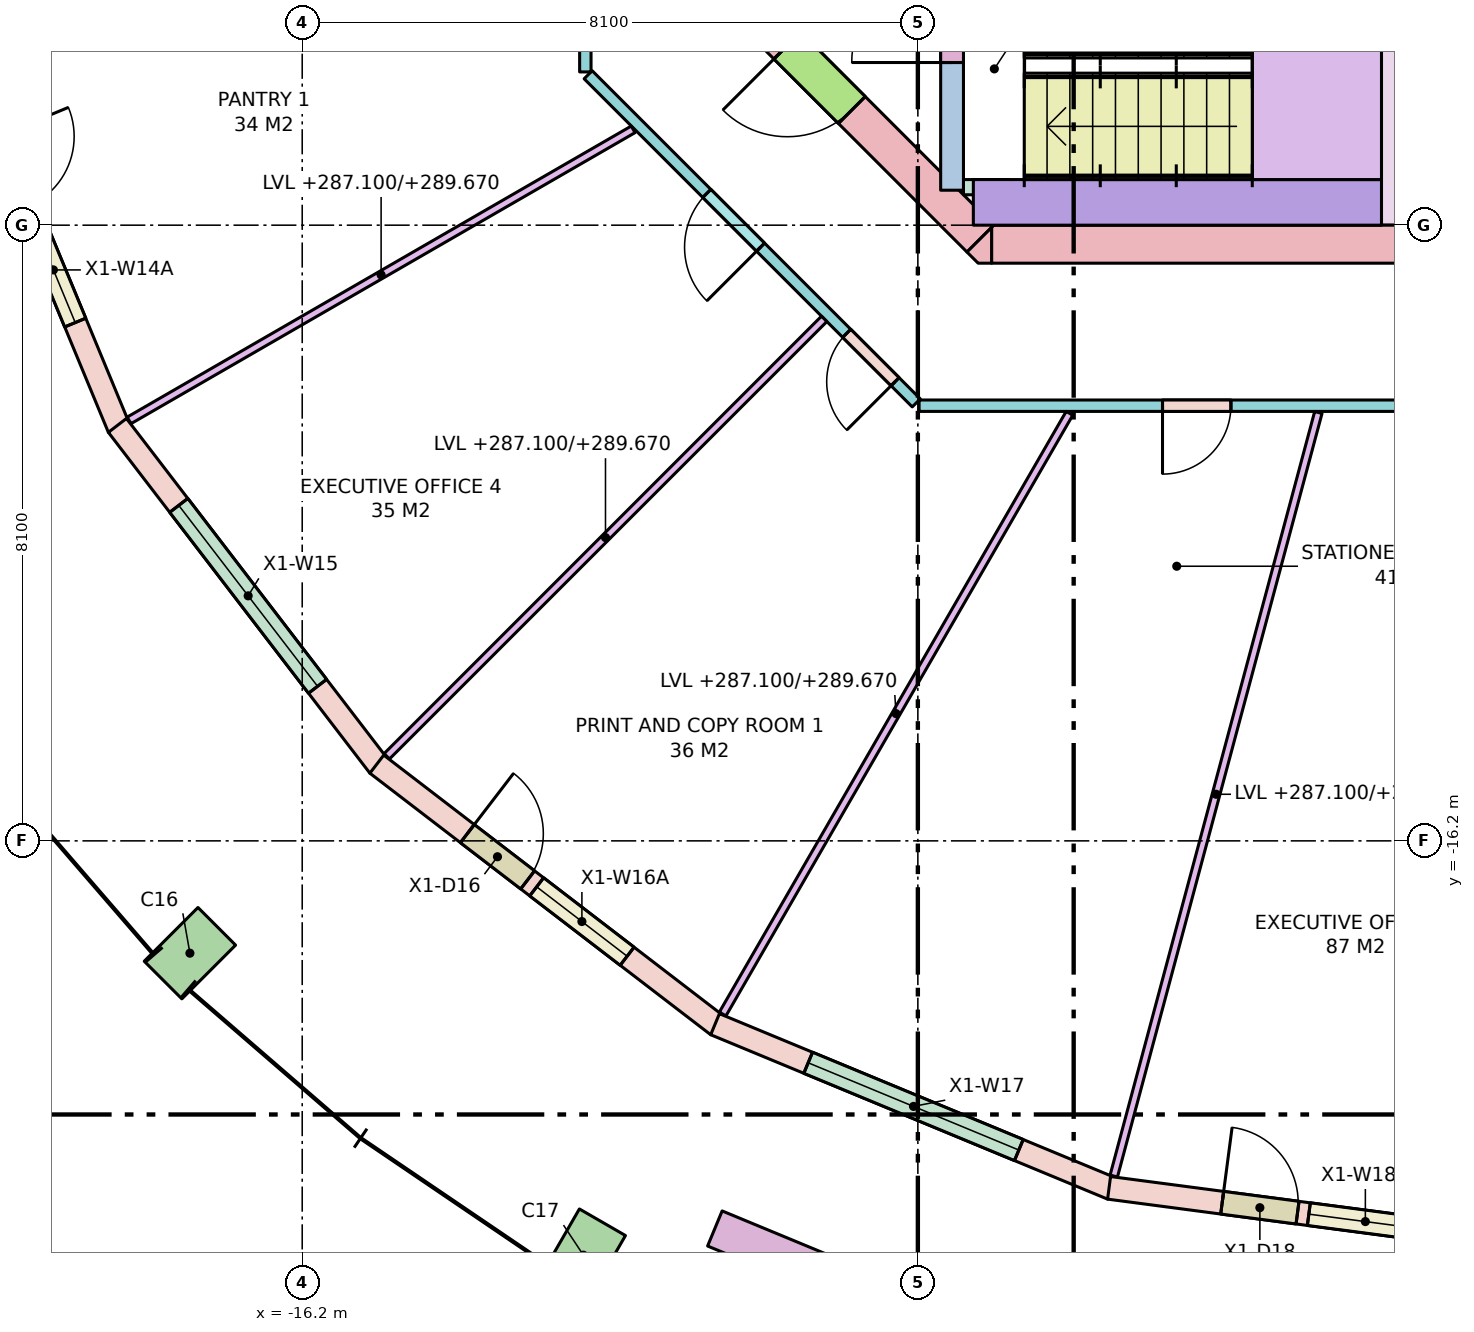
"""IFC4 building model, lengths in metres.
Left out: names, types, materials, properties, quantities, classifications, styles, units other than length and angle.
Written with IfcOpenShell. Run it as: python <this file> out.ifc"""

import sys

from ifc_helpers import new_model, si_unit, direction, frame, frame_2d, origin, origin_2d, place, context, subcontext, project, spatial, polyline, rectangle, outline, extrude, element, fill, save


model = new_model("IFC4")
c1 = context("Model", 3, precision=1e-05, world=origin(), true_north=direction((0.0, 1.0)))
c2 = subcontext(c1, "Body", "Model", "MODEL_VIEW")
j1 = project(units=[si_unit("LENGTHUNIT", "METRE"), si_unit("PLANEANGLEUNIT", "RADIAN")], contexts=[c1])
p1 = place(None, origin())
s1 = spatial("IfcSite", under=j1, at=p1, CompositionType="ELEMENT")
p2 = place(p1, origin())
s2 = spatial("IfcBuilding", under=s1, at=p2, CompositionType="ELEMENT")
p3 = place(p2, frame((0.0, 0.0, 287.1)))
s3 = spatial("IfcBuildingStorey", under=s2, at=p3, CompositionType="ELEMENT", Elevation=287.1)
for number, where, z_axis, x_axis in (
    (1, (-17.678, -17.678, 0.0), (0.0, 0.0, 1.0), (0.707, -0.707, 0.0)),
    (2, (-12.5, -21.651, 0.0), (0.0, 0.0, 1.0), (0.866, -0.5, 0.0)),
):
    element("IfcColumn", number, at=place(p3, frame(where, z_axis=z_axis, x_axis=x_axis)), inside=s3, PredefinedType="COLUMN", context=c2, shape_type="SweptSolid", body=[
        extrude(rectangle(XDim=0.7, YDim=1.0, at=origin_2d()), origin(), (0.0, 0.0, 1.0), 3.7),
    ])
p4 = place(p3, frame((-7.13, -8.35, -0.28), z_axis=(0.0, 0.0, 1.0), x_axis=(1.0, 0.0, 0.0)))
e3 = element("IfcWall", 3, at=p4, inside=s3, PredefinedType="SHEAR", context=c2, shape_type="SweptSolid", body=[
    extrude(rectangle(XDim=14.26, YDim=0.5, at=frame_2d((7.13, 0.0))), origin(), (0.0, 0.0, 1.0), 3.7),
])
p5 = place(p4, frame((8.08, 0.0, 0.28)))
e4 = element("IfcOpeningElement", 4, at=p5, cuts=e3, PredefinedType="OPENING", context=c2, shape_type="SweptSolid", body=[
    extrude(rectangle(XDim=0.7, YDim=2.1, at=frame_2d((0.35, 1.05))), frame((0.0, 0.26, 0.0), z_axis=(0.0, -1.0, 0.0), x_axis=(1.0, 0.0, 0.0)), (0.0, 0.0, 1.0), 0.52),
])
p6 = place(p4, frame((6.205, 0.0, 0.28)))
e5 = element("IfcOpeningElement", 5, at=p6, cuts=e3, PredefinedType="OPENING", context=c2, shape_type="SweptSolid", body=[
    extrude(rectangle(XDim=0.9, YDim=2.1, at=frame_2d((0.45, 1.05))), frame((0.0, 0.26, 0.0), z_axis=(0.0, -1.0, 0.0), x_axis=(1.0, 0.0, 0.0)), (0.0, 0.0, 1.0), 0.52),
])
p7 = place(p4, frame((10.667, 0.0, 0.28)))
e6 = element("IfcOpeningElement", 6, at=p7, cuts=e3, PredefinedType="OPENING", context=c2, shape_type="SweptSolid", body=[
    extrude(rectangle(XDim=0.9, YDim=2.1, at=frame_2d((0.45, 1.05))), frame((0.0, 0.26, 0.0), z_axis=(0.0, -1.0, 0.0), x_axis=(1.0, 0.0, 0.0)), (0.0, 0.0, 1.0), 0.52),
])
p8 = place(p3, frame((-7.277, -8.277, -0.28), z_axis=(0.0, 0.0, 1.0), x_axis=(-0.707106781187, 0.707106781187, 0.0)))
e7 = element("IfcWall", 7, at=p8, inside=s3, PredefinedType="SHEAR", context=c2, shape_type="SweptSolid", body=[
    extrude(rectangle(XDim=4.243, YDim=0.5, at=frame_2d((2.121, 0.0))), origin(), (0.0, 0.0, 1.0), 3.7),
])
p9 = place(p8, frame((2.393, 0.0, 0.28)))
e8 = element("IfcOpeningElement", 8, at=p9, cuts=e7, PredefinedType="OPENING", context=c2, shape_type="SweptSolid", body=[
    extrude(rectangle(XDim=1.2, YDim=2.1, at=frame_2d((0.6, 1.05))), frame((0.0, 0.26, 0.0), z_axis=(0.0, -1.0, 0.0), x_axis=(1.0, 0.0, 0.0)), (0.0, 0.0, 1.0), 0.52),
])
p10 = place(p3, frame((0.0, 0.0, -0.28)))
e9 = element("IfcWall", 9, at=p10, inside=s3, PredefinedType="SHEAR", context=c2, shape_type="SweptSolid", body=[
    extrude(outline(polyline([(-7.307, -8.6), (-7.454, -8.454), (-7.13, -8.13), (-7.13, -8.6), (-7.307, -8.6)])), origin(), (0.0, 0.0, 1.0), 3.7),
])
p11 = place(p3, frame((-1.85, -8.1, 0.0), z_axis=(0.0, 0.0, 1.0), x_axis=(0.0, 1.0, 0.0)))
e10 = element("IfcWall", 10, at=p11, inside=s3, PredefinedType="SHEAR", context=c2, shape_type="SweptSolid", body=[
    extrude(rectangle(XDim=6.6, YDim=0.3, at=frame_2d((3.3, 0.0))), origin(), (0.0, 0.0, 1.0), 3.42),
])
p12 = place(p3, frame((-7.65, -7.64, 0.0), z_axis=(0.0, 0.0, 1.0), x_axis=(0.0, 1.0, 0.0)))
e11 = element("IfcWall", 11, at=p12, inside=s3, PredefinedType="SHEAR", context=c2, shape_type="SweptSolid", body=[
    extrude(rectangle(XDim=3.14, YDim=0.3, at=frame_2d((1.57, 0.0))), origin(), (0.0, 0.0, 1.0), 3.42),
])
p13 = place(p12, frame((1.68, 0.0, 0.0)))
e12 = element("IfcOpeningElement", 12, at=p13, cuts=e11, PredefinedType="OPENING", context=c2, shape_type="SweptSolid", body=[
    extrude(rectangle(XDim=1.32, YDim=2.1, at=frame_2d((0.66, 1.05))), frame((0.0, 0.16, 0.0), z_axis=(0.0, -1.0, 0.0), x_axis=(1.0, 0.0, 0.0)), (0.0, 0.0, 1.0), 0.32),
])
p14 = place(p3, frame((-7.5, -7.6, 0.0), z_axis=(0.0, 0.0, 1.0), x_axis=(1.0, 0.0, 0.0)))
e13 = element("IfcWall", 13, at=p14, inside=s3, PredefinedType="SHEAR", context=c2, shape_type="SweptSolid", body=[
    extrude(rectangle(XDim=0.6, YDim=0.2, at=frame_2d((0.3, 0.0))), origin(), (0.0, 0.0, 1.0), 3.42),
])
p15 = place(p3, frame((-7.37, -7.8, 0.0), z_axis=(0.0, 0.0, 1.0), x_axis=(1.0, 0.0, 0.0)))
e14 = element("IfcWall", 14, at=p15, inside=s3, PredefinedType="SHEAR", context=c2, shape_type="SweptSolid", body=[
    extrude(rectangle(XDim=5.37, YDim=0.6, at=frame_2d((2.685, 0.0))), origin(), (0.0, 0.0, 1.0), 3.42),
])
p16 = place(p3, frame((-20.775, -5.546, 0.0), z_axis=(0.0, 0.0, 1.0), x_axis=(0.382660798975, -0.923888907244, 0.0)))
e15 = element("IfcWall", 15, at=p16, inside=s3, PredefinedType="STANDARD", context=c2, shape_type="SweptSolid", body=[
    extrude(rectangle(XDim=5.652, YDim=0.3, at=frame_2d((2.826, 0.0))), origin(), (0.0, 0.0, 1.0), 3.42),
])
p17 = place(p16, frame((1.501, 0.0, 0.0)))
e16 = element("IfcOpeningElement", 16, at=p17, cuts=e15, PredefinedType="OPENING", context=c2, shape_type="SweptSolid", body=[
    extrude(rectangle(XDim=1.0, YDim=2.4, at=frame_2d((0.5, 1.2))), frame((0.0, 0.16, 0.0), z_axis=(0.0, -1.0, 0.0), x_axis=(1.0, 0.0, 0.0)), (0.0, 0.0, 1.0), 0.32),
])
p18 = place(p16, frame((2.651, 0.0, 0.8)))
e17 = element("IfcOpeningElement", 17, at=p18, cuts=e15, PredefinedType="OPENING", context=c2, shape_type="SweptSolid", body=[
    extrude(rectangle(XDim=1.5, YDim=2.4, at=frame_2d((0.75, 1.2))), frame((0.0, 0.16, 0.0), z_axis=(0.0, -1.0, 0.0), x_axis=(1.0, 0.0, 0.0)), (0.0, 0.0, 1.0), 0.32),
])
p19 = place(p3, frame((-18.632, -10.734, 0.0), z_axis=(0.0, 0.0, 1.0), x_axis=(0.608747976925, -0.793363662257, 0.0)))
e18 = element("IfcWall", 18, at=p19, inside=s3, PredefinedType="STANDARD", context=c2, shape_type="SweptSolid", body=[
    extrude(rectangle(XDim=5.652, YDim=0.3, at=frame_2d((2.826, 0.0))), origin(), (0.0, 0.0, 1.0), 3.42),
])
p20 = place(p19, frame((1.326, 0.0, 0.8)))
e19 = element("IfcOpeningElement", 19, at=p20, cuts=e18, PredefinedType="OPENING", context=c2, shape_type="SweptSolid", body=[
    extrude(rectangle(XDim=3.0, YDim=2.4, at=frame_2d((1.5, 1.2))), frame((0.0, 0.16, 0.0), z_axis=(0.0, -1.0, 0.0), x_axis=(1.0, 0.0, 0.0)), (0.0, 0.0, 1.0), 0.32),
])
p21 = place(p3, frame((-15.219, -15.191, 0.0), z_axis=(0.0, 0.0, 1.0), x_axis=(0.793363662257, -0.608747976925, 0.0)))
e20 = element("IfcWall", 20, at=p21, inside=s3, PredefinedType="STANDARD", context=c2, shape_type="SweptSolid", body=[
    extrude(rectangle(XDim=5.652, YDim=0.3, at=frame_2d((2.826, 0.0))), origin(), (0.0, 0.0, 1.0), 3.42),
])
p22 = place(p21, frame((1.501, 0.0, 0.0)))
e21 = element("IfcOpeningElement", 21, at=p22, cuts=e20, PredefinedType="OPENING", context=c2, shape_type="SweptSolid", body=[
    extrude(rectangle(XDim=1.0, YDim=2.4, at=frame_2d((0.5, 1.2))), frame((0.0, 0.16, 0.0), z_axis=(0.0, -1.0, 0.0), x_axis=(1.0, 0.0, 0.0)), (0.0, 0.0, 1.0), 0.32),
])
p23 = place(p21, frame((2.651, 0.0, 0.8)))
e22 = element("IfcOpeningElement", 22, at=p23, cuts=e20, PredefinedType="OPENING", context=c2, shape_type="SweptSolid", body=[
    extrude(rectangle(XDim=1.5, YDim=2.4, at=frame_2d((0.75, 1.2))), frame((0.0, 0.16, 0.0), z_axis=(0.0, -1.0, 0.0), x_axis=(1.0, 0.0, 0.0)), (0.0, 0.0, 1.0), 0.32),
])
p24 = place(p3, frame((-10.768, -18.612, 0.0), z_axis=(0.0, 0.0, 1.0), x_axis=(0.923888907244, -0.382660798975, 0.0)))
e23 = element("IfcWall", 23, at=p24, inside=s3, PredefinedType="STANDARD", context=c2, shape_type="SweptSolid", body=[
    extrude(rectangle(XDim=5.652, YDim=0.3, at=frame_2d((2.826, 0.0))), origin(), (0.0, 0.0, 1.0), 3.42),
])
p25 = place(p24, frame((1.326, 0.0, 0.8)))
e24 = element("IfcOpeningElement", 24, at=p25, cuts=e23, PredefinedType="OPENING", context=c2, shape_type="SweptSolid", body=[
    extrude(rectangle(XDim=3.0, YDim=2.4, at=frame_2d((1.5, 1.2))), frame((0.0, 0.16, 0.0), z_axis=(0.0, -1.0, 0.0), x_axis=(1.0, 0.0, 0.0)), (0.0, 0.0, 1.0), 0.32),
])
p26 = place(p3, frame((-5.584, -20.765, 0.0), z_axis=(0.0, 0.0, 1.0), x_axis=(0.991443853938, -0.130533844229, 0.0)))
e25 = element("IfcWall", 25, at=p26, inside=s3, PredefinedType="STANDARD", context=c2, shape_type="SweptSolid", body=[
    extrude(rectangle(XDim=5.652, YDim=0.3, at=frame_2d((2.826, 0.0))), origin(), (0.0, 0.0, 1.0), 3.42),
])
p27 = place(p26, frame((1.501, 0.0, 0.0)))
e26 = element("IfcOpeningElement", 26, at=p27, cuts=e25, PredefinedType="OPENING", context=c2, shape_type="SweptSolid", body=[
    extrude(rectangle(XDim=1.0, YDim=2.4, at=frame_2d((0.5, 1.2))), frame((0.0, 0.16, 0.0), z_axis=(0.0, -1.0, 0.0), x_axis=(1.0, 0.0, 0.0)), (0.0, 0.0, 1.0), 0.32),
])
p28 = place(p26, frame((2.651, 0.0, 0.8)))
e27 = element("IfcOpeningElement", 27, at=p28, cuts=e25, PredefinedType="OPENING", context=c2, shape_type="SweptSolid", body=[
    extrude(rectangle(XDim=1.5, YDim=2.4, at=frame_2d((0.75, 1.2))), frame((0.0, 0.16, 0.0), z_axis=(0.0, -1.0, 0.0), x_axis=(1.0, 0.0, 0.0)), (0.0, 0.0, 1.0), 0.32),
])
p29 = place(p3, frame((-10.771, -21.3, 0.0), z_axis=(0.0, 0.0, 1.0), x_axis=(0.923875488976, -0.382693194178, 0.0)))
e28 = element("IfcWall", 28, at=p29, inside=s3, PredefinedType="PARAPET", context=c2, shape_type="SweptSolid", body=[
    extrude(rectangle(XDim=3.6, YDim=0.5, at=frame_2d((1.8, 0.0))), origin(), (0.0, 0.0, 1.0), 0.9),
])
p30 = place(p3, frame((8.084, -10.475, 0.0), z_axis=(0.0, 0.0, 1.0), x_axis=(-1.0, 0.0, 0.0)))
e29 = element("IfcWall", 29, at=p30, inside=s3, PredefinedType="PARTITIONING", context=c2, shape_type="SweptSolid", body=[
    extrude(rectangle(XDim=16.167, YDim=0.15, at=frame_2d((8.084, 0.0))), origin(), (0.0, 0.0, 1.0), 2.57),
])
p31 = place(p30, frame((12.065, 0.0, 0.0)))
e30 = element("IfcOpeningElement", 30, at=p31, cuts=e29, PredefinedType="OPENING", context=c2, shape_type="SweptSolid", body=[
    extrude(rectangle(XDim=0.9, YDim=2.1, at=frame_2d((0.45, 1.05))), frame((0.0, 0.085, 0.0), z_axis=(0.0, -1.0, 0.0), x_axis=(1.0, 0.0, 0.0)), (0.0, 0.0, 1.0), 0.17),
])
p32 = place(p30, frame((7.584, 0.0, 0.0)))
e31 = element("IfcOpeningElement", 31, at=p32, cuts=e29, PredefinedType="OPENING", context=c2, shape_type="SweptSolid", body=[
    extrude(rectangle(XDim=1.0, YDim=2.1, at=frame_2d((0.5, 1.05))), frame((0.0, 0.085, 0.0), z_axis=(0.0, -1.0, 0.0), x_axis=(1.0, 0.0, 0.0)), (0.0, 0.0, 1.0), 0.17),
])
p33 = place(p30, frame((3.153, 0.0, 0.0)))
e32 = element("IfcOpeningElement", 32, at=p33, cuts=e29, PredefinedType="OPENING", context=c2, shape_type="SweptSolid", body=[
    extrude(rectangle(XDim=1.0, YDim=2.1, at=frame_2d((0.5, 1.05))), frame((0.0, 0.085, 0.0), z_axis=(0.0, -1.0, 0.0), x_axis=(1.0, 0.0, 0.0)), (0.0, 0.0, 1.0), 0.17),
])
p34 = place(p3, frame((-8.121, -10.438, 0.0), z_axis=(0.0, 0.0, 1.0), x_axis=(-0.707106781187, 0.707106781187, 0.0)))
e33 = element("IfcWall", 33, at=p34, inside=s3, PredefinedType="PARTITIONING", context=c2, shape_type="SweptSolid", body=[
    extrude(rectangle(XDim=6.105, YDim=0.15, at=frame_2d((3.053, 0.0))), origin(), (0.0, 0.0, 1.0), 2.57),
])
p35 = place(p34, frame((2.897, 0.0, 0.0)))
e34 = element("IfcOpeningElement", 34, at=p35, cuts=e33, PredefinedType="OPENING", context=c2, shape_type="SweptSolid", body=[
    extrude(rectangle(XDim=1.0, YDim=2.1, at=frame_2d((0.5, 1.05))), frame((0.0, 0.085, 0.0), z_axis=(0.0, -1.0, 0.0), x_axis=(1.0, 0.0, 0.0)), (0.0, 0.0, 1.0), 0.17),
])
p36 = place(p34, frame((0.394, 0.0, 0.0)))
e35 = element("IfcOpeningElement", 35, at=p36, cuts=e33, PredefinedType="OPENING", context=c2, shape_type="SweptSolid", body=[
    extrude(rectangle(XDim=0.9, YDim=2.1, at=frame_2d((0.45, 1.05))), frame((0.0, 0.085, 0.0), z_axis=(0.0, -1.0, 0.0), x_axis=(1.0, 0.0, 0.0)), (0.0, 0.0, 1.0), 0.17),
])
p37 = place(p3, frame((-12.475, -6.084, 0.0), z_axis=(0.0, 0.0, 1.0), x_axis=(0.0, 1.0, 0.0)))
e36 = element("IfcWall", 36, at=p37, inside=s3, PredefinedType="PARTITIONING", context=c2, shape_type="SweptSolid", body=[
    extrude(rectangle(XDim=12.167, YDim=0.15, at=frame_2d((6.084, 0.0))), origin(), (0.0, 0.0, 1.0), 2.57),
])
p38 = place(p37, frame((10.322, 0.0, 0.0)))
e37 = element("IfcOpeningElement", 37, at=p38, cuts=e36, PredefinedType="OPENING", context=c2, shape_type="SweptSolid", body=[
    extrude(rectangle(XDim=0.9, YDim=2.1, at=frame_2d((0.45, 1.05))), frame((0.0, 0.085, 0.0), z_axis=(0.0, -1.0, 0.0), x_axis=(1.0, 0.0, 0.0)), (0.0, 0.0, 1.0), 0.17),
])
p39 = place(p37, frame((7.256, 0.0, 0.0)))
e38 = element("IfcOpeningElement", 38, at=p39, cuts=e36, PredefinedType="OPENING", context=c2, shape_type="SweptSolid", body=[
    extrude(rectangle(XDim=1.0, YDim=2.1, at=frame_2d((0.5, 1.05))), frame((0.0, 0.085, 0.0), z_axis=(0.0, -1.0, 0.0), x_axis=(1.0, 0.0, 0.0)), (0.0, 0.0, 1.0), 0.17),
])
p40 = place(p37, frame((3.912, 0.0, 0.0)))
e39 = element("IfcOpeningElement", 39, at=p40, cuts=e36, PredefinedType="OPENING", context=c2, shape_type="SweptSolid", body=[
    extrude(rectangle(XDim=1.0, YDim=2.1, at=frame_2d((0.5, 1.05))), frame((0.0, 0.085, 0.0), z_axis=(0.0, -1.0, 0.0), x_axis=(1.0, 0.0, 0.0)), (0.0, 0.0, 1.0), 0.17),
])
p41 = place(p37, frame((0.946, 0.0, 0.0)))
e40 = element("IfcOpeningElement", 40, at=p41, cuts=e36, PredefinedType="OPENING", context=c2, shape_type="SweptSolid", body=[
    extrude(rectangle(XDim=0.9, YDim=2.1, at=frame_2d((0.45, 1.05))), frame((0.0, 0.085, 0.0), z_axis=(0.0, -1.0, 0.0), x_axis=(1.0, 0.0, 0.0)), (0.0, 0.0, 1.0), 0.17),
])
p42 = place(p3, frame((-11.846, -6.839, 0.0), z_axis=(0.0, 0.0, 1.0), x_axis=(-0.866007734672, -0.500030602552, 0.0)))
e41 = element("IfcWall", 41, at=p42, inside=s3, PredefinedType="PARTITIONING", context=c2, shape_type="SweptSolid", body=[
    extrude(rectangle(XDim=7.658, YDim=0.1, at=frame_2d((3.829, 0.0))), origin(), (0.0, 0.0, 1.0), 2.57),
])
p43 = place(p3, frame((-9.333, -9.333, 0.0), z_axis=(0.0, 0.0, 1.0), x_axis=(-0.707106781187, -0.707106781187, 0.0)))
e42 = element("IfcWall", 42, at=p43, inside=s3, PredefinedType="PARTITIONING", context=c2, shape_type="SweptSolid", body=[
    extrude(rectangle(XDim=8.139, YDim=0.1, at=frame_2d((4.069, 0.0))), origin(), (0.0, 0.0, 1.0), 2.57),
])
p44 = place(p3, frame((-6.105, -10.575, 0.0), z_axis=(0.0, 0.0, 1.0), x_axis=(-0.500020406621, -0.866013621696, 0.0)))
e43 = element("IfcWall", 43, at=p44, inside=s3, PredefinedType="PARTITIONING", context=c2, shape_type="SweptSolid", body=[
    extrude(rectangle(XDim=9.126, YDim=0.1, at=frame_2d((4.563, 0.0))), origin(), (0.0, 0.0, 1.0), 2.57),
])
p45 = place(p3, frame((-2.831, -10.564, 0.0), z_axis=(0.0, 0.0, 1.0), x_axis=(-0.258796321138, -0.965931914871, 0.0)))
e44 = element("IfcWall", 44, at=p45, inside=s3, PredefinedType="PARTITIONING", context=c2, shape_type="SweptSolid", body=[
    extrude(rectangle(XDim=10.4, YDim=0.1, at=frame_2d((5.2, 0.0))), origin(), (0.0, 0.0, 1.0), 2.57),
])
p46 = place(p18, origin())
e45 = element("IfcWindow", 45, at=p46, inside=s3, PartitioningType="SINGLE_PANEL", PredefinedType="WINDOW", context=c2, shape_type="SweptSolid", body=[
    extrude(rectangle(XDim=1.5, YDim=2.4, at=frame_2d((0.75, 1.2))), frame((0.0, 0.03, 0.0), z_axis=(0.0, -1.0, 0.0), x_axis=(1.0, 0.0, 0.0)), (0.0, 0.0, 1.0), 0.06),
])
fill(e17, e45)
p47 = place(p20, origin())
e46 = element("IfcWindow", 46, at=p47, inside=s3, PartitioningType="SINGLE_PANEL", PredefinedType="WINDOW", context=c2, shape_type="SweptSolid", body=[
    extrude(rectangle(XDim=3.0, YDim=2.4, at=frame_2d((1.5, 1.2))), frame((0.0, 0.03, 0.0), z_axis=(0.0, -1.0, 0.0), x_axis=(1.0, 0.0, 0.0)), (0.0, 0.0, 1.0), 0.06),
])
fill(e19, e46)
p48 = place(p22, origin())
e47 = element("IfcDoor", 47, at=p48, inside=s3, OperationType="SINGLE_SWING_LEFT", PredefinedType="DOOR", context=c2, shape_type="SweptSolid", body=[
    extrude(rectangle(XDim=1.0, YDim=2.4, at=frame_2d((0.5, 1.2))), frame((0.0, 0.025, 0.0), z_axis=(0.0, -1.0, 0.0), x_axis=(1.0, 0.0, 0.0)), (0.0, 0.0, 1.0), 0.05),
])
fill(e21, e47)
p49 = place(p23, origin())
e48 = element("IfcWindow", 48, at=p49, inside=s3, PartitioningType="SINGLE_PANEL", PredefinedType="WINDOW", context=c2, shape_type="SweptSolid", body=[
    extrude(rectangle(XDim=1.5, YDim=2.4, at=frame_2d((0.75, 1.2))), frame((0.0, 0.03, 0.0), z_axis=(0.0, -1.0, 0.0), x_axis=(1.0, 0.0, 0.0)), (0.0, 0.0, 1.0), 0.06),
])
fill(e22, e48)
p50 = place(p25, origin())
e49 = element("IfcWindow", 49, at=p50, inside=s3, PartitioningType="SINGLE_PANEL", PredefinedType="WINDOW", context=c2, shape_type="SweptSolid", body=[
    extrude(rectangle(XDim=3.0, YDim=2.4, at=frame_2d((1.5, 1.2))), frame((0.0, 0.03, 0.0), z_axis=(0.0, -1.0, 0.0), x_axis=(1.0, 0.0, 0.0)), (0.0, 0.0, 1.0), 0.06),
])
fill(e24, e49)
p51 = place(p27, origin())
e50 = element("IfcDoor", 50, at=p51, inside=s3, OperationType="SINGLE_SWING_LEFT", PredefinedType="DOOR", context=c2, shape_type="SweptSolid", body=[
    extrude(rectangle(XDim=1.0, YDim=2.4, at=frame_2d((0.5, 1.2))), frame((0.0, 0.025, 0.0), z_axis=(0.0, -1.0, 0.0), x_axis=(1.0, 0.0, 0.0)), (0.0, 0.0, 1.0), 0.05),
])
fill(e26, e50)
p52 = place(p28, origin())
e51 = element("IfcWindow", 51, at=p52, inside=s3, PartitioningType="SINGLE_PANEL", PredefinedType="WINDOW", context=c2, shape_type="SweptSolid", body=[
    extrude(rectangle(XDim=1.5, YDim=2.4, at=frame_2d((0.75, 1.2))), frame((0.0, 0.03, 0.0), z_axis=(0.0, -1.0, 0.0), x_axis=(1.0, 0.0, 0.0)), (0.0, 0.0, 1.0), 0.06),
])
fill(e27, e51)
p53 = place(p13, origin())
e52 = element("IfcDoor", 52, at=p53, inside=s3, OperationType="DOUBLE_DOOR_SINGLE_SWING", PredefinedType="DOOR", context=c2, shape_type="SweptSolid", body=[
    extrude(rectangle(XDim=1.32, YDim=2.1, at=frame_2d((0.66, 1.05))), frame((0.0, 0.025, 0.0), z_axis=(0.0, -1.0, 0.0), x_axis=(1.0, 0.0, 0.0)), (0.0, 0.0, 1.0), 0.05),
])
fill(e12, e52)
p54 = place(p9, origin())
e53 = element("IfcDoor", 53, at=p54, inside=s3, OperationType="SINGLE_SWING_RIGHT", PredefinedType="DOOR", context=c2, shape_type="SweptSolid", body=[
    extrude(rectangle(XDim=1.2, YDim=2.1, at=frame_2d((0.6, 1.05))), frame((0.0, 0.025, 0.0), z_axis=(0.0, -1.0, 0.0), x_axis=(1.0, 0.0, 0.0)), (0.0, 0.0, 1.0), 0.05),
])
fill(e8, e53)
p55 = place(p35, origin())
e54 = element("IfcDoor", 54, at=p55, inside=s3, OperationType="SINGLE_SWING_LEFT", PredefinedType="DOOR", context=c2, shape_type="SweptSolid", body=[
    extrude(rectangle(XDim=1.0, YDim=2.1, at=frame_2d((0.5, 1.05))), frame((0.0, 0.025, 0.0), z_axis=(0.0, -1.0, 0.0), x_axis=(1.0, 0.0, 0.0)), (0.0, 0.0, 1.0), 0.05),
])
fill(e34, e54)
p56 = place(p36, origin())
e55 = element("IfcDoor", 55, at=p56, inside=s3, OperationType="SINGLE_SWING_LEFT", PredefinedType="DOOR", context=c2, shape_type="SweptSolid", body=[
    extrude(rectangle(XDim=0.9, YDim=2.1, at=frame_2d((0.45, 1.05))), frame((0.0, 0.025, 0.0), z_axis=(0.0, -1.0, 0.0), x_axis=(1.0, 0.0, 0.0)), (0.0, 0.0, 1.0), 0.05),
])
fill(e35, e55)
p57 = place(p31, origin())
e56 = element("IfcDoor", 56, at=p57, inside=s3, OperationType="SINGLE_SWING_RIGHT", PredefinedType="DOOR", context=c2, shape_type="SweptSolid", body=[
    extrude(rectangle(XDim=0.9, YDim=2.1, at=frame_2d((0.45, 1.05))), frame((0.0, 0.025, 0.0), z_axis=(0.0, -1.0, 0.0), x_axis=(1.0, 0.0, 0.0)), (0.0, 0.0, 1.0), 0.05),
])
fill(e30, e56)
save(model, sys.argv[1])
